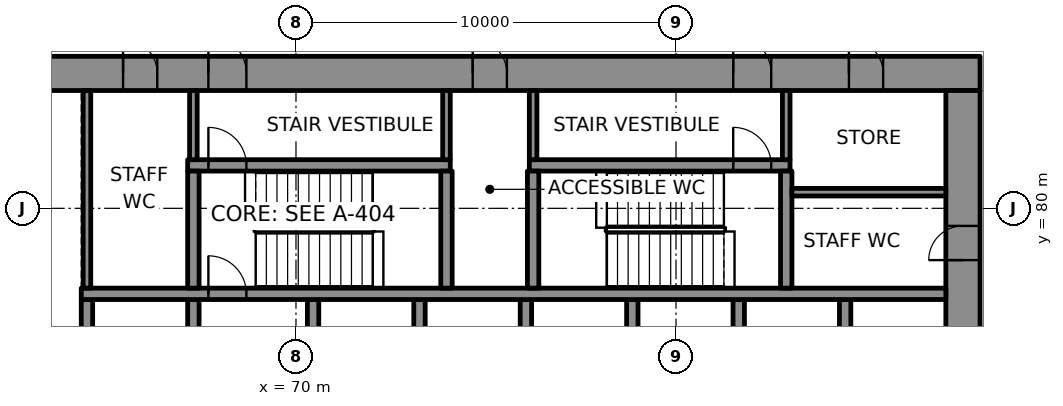
"""IFC4 building model, lengths in metres.
Left out: names, types, materials, properties, quantities, classifications, styles, units other than length and angle.
Written with IfcOpenShell. Run it as: python <this file> out.ifc"""

import sys

from ifc_helpers import new_model, si_unit, direction, frame, frame_2d, origin, place, context, subcontext, project, spatial, rectangle, extrude, element, fill, save


model = new_model("IFC4")
c1 = context("Model", 3, precision=1e-05, world=origin(), true_north=direction((0.0, 1.0)))
c2 = subcontext(c1, "Body", "Model", "MODEL_VIEW")
j1 = project(units=[si_unit("LENGTHUNIT", "METRE"), si_unit("PLANEANGLEUNIT", "RADIAN")], contexts=[c1])
p1 = place(None, origin())
s1 = spatial("IfcSite", under=j1, at=p1, CompositionType="ELEMENT")
p2 = place(p1, origin())
s2 = spatial("IfcBuilding", under=s1, at=p2, CompositionType="ELEMENT")
p3 = place(p2, frame((0.0, 0.0, 44.2)))
s3 = spatial("IfcBuildingStorey", under=s2, at=p3, CompositionType="ELEMENT", Elevation=44.2)
p4 = place(p3, frame((62.9, 83.55, 0.0), z_axis=(0.0, 0.0, 1.0), x_axis=(1.0, 0.0, 0.0)))
e1 = element("IfcWall", 1, at=p4, inside=s3, PredefinedType="SHEAR", context=c2, shape_type="SweptSolid", body=[
    extrude(rectangle(XDim=25.1, YDim=0.9, at=frame_2d((12.55, 0.0))), origin(), (0.0, 0.0, 1.0), 4.0),
])
p5 = place(p4, frame((4.795, 0.0, 0.0)))
e2 = element("IfcOpeningElement", 2, at=p5, cuts=e1, PredefinedType="OPENING", context=c2, shape_type="SweptSolid", body=[
    extrude(rectangle(XDim=1.0, YDim=2.1, at=frame_2d((0.5, 1.05))), frame((0.0, 0.46, 0.0), z_axis=(0.0, -1.0, 0.0), x_axis=(1.0, 0.0, 0.0)), (0.0, 0.0, 1.0), 0.92),
])
p6 = place(p4, frame((18.605, 0.0, 0.0)))
e3 = element("IfcOpeningElement", 3, at=p6, cuts=e1, PredefinedType="OPENING", context=c2, shape_type="SweptSolid", body=[
    extrude(rectangle(XDim=1.0, YDim=2.1, at=frame_2d((0.5, 1.05))), frame((0.0, 0.46, 0.0), z_axis=(0.0, -1.0, 0.0), x_axis=(1.0, 0.0, 0.0)), (0.0, 0.0, 1.0), 0.92),
])
p7 = place(p4, frame((2.55, 0.0, 0.0)))
e4 = element("IfcOpeningElement", 4, at=p7, cuts=e1, PredefinedType="OPENING", context=c2, shape_type="SweptSolid", body=[
    extrude(rectangle(XDim=0.9, YDim=2.1, at=frame_2d((0.45, 1.05))), frame((0.0, 0.46, 0.0), z_axis=(0.0, -1.0, 0.0), x_axis=(1.0, 0.0, 0.0)), (0.0, 0.0, 1.0), 0.92),
])
p8 = place(p4, frame((11.75, 0.0, 0.0)))
e5 = element("IfcOpeningElement", 5, at=p8, cuts=e1, PredefinedType="OPENING", context=c2, shape_type="SweptSolid", body=[
    extrude(rectangle(XDim=0.9, YDim=2.1, at=frame_2d((0.45, 1.05))), frame((0.0, 0.46, 0.0), z_axis=(0.0, -1.0, 0.0), x_axis=(1.0, 0.0, 0.0)), (0.0, 0.0, 1.0), 0.92),
])
p9 = place(p4, frame((21.65, 0.0, 0.0)))
e6 = element("IfcOpeningElement", 6, at=p9, cuts=e1, PredefinedType="OPENING", context=c2, shape_type="SweptSolid", body=[
    extrude(rectangle(XDim=0.9, YDim=2.1, at=frame_2d((0.45, 1.05))), frame((0.0, 0.46, 0.0), z_axis=(0.0, -1.0, 0.0), x_axis=(1.0, 0.0, 0.0)), (0.0, 0.0, 1.0), 0.92),
])
p10 = place(p3, frame((87.55, 66.9, 0.0), z_axis=(0.0, 0.0, 1.0), x_axis=(0.0, 1.0, 0.0)))
e7 = element("IfcWall", 7, at=p10, inside=s3, PredefinedType="SHEAR", context=c2, shape_type="SweptSolid", body=[
    extrude(rectangle(XDim=16.2, YDim=0.9, at=frame_2d((8.1, 0.0))), origin(), (0.0, 0.0, 1.0), 4.0),
])
p11 = place(p10, frame((5.5, 0.0, 0.0)))
e8 = element("IfcOpeningElement", 8, at=p11, cuts=e7, PredefinedType="OPENING", context=c2, shape_type="SweptSolid", body=[
    extrude(rectangle(XDim=1.8, YDim=2.1, at=frame_2d((0.9, 1.05))), frame((0.0, 0.46, 0.0), z_axis=(0.0, -1.0, 0.0), x_axis=(1.0, 0.0, 0.0)), (0.0, 0.0, 1.0), 0.92),
])
p12 = place(p10, frame((11.738, 0.0, 0.0)))
e9 = element("IfcOpeningElement", 9, at=p12, cuts=e7, PredefinedType="OPENING", context=c2, shape_type="SweptSolid", body=[
    extrude(rectangle(XDim=0.9, YDim=2.1, at=frame_2d((0.45, 1.05))), frame((0.0, 0.46, 0.0), z_axis=(0.0, -1.0, 0.0), x_axis=(1.0, 0.0, 0.0)), (0.0, 0.0, 1.0), 0.92),
])
for number, where, z_axis, x_axis in (
    (10, (64.5, 75.0, 0.0), (0.0, 0.0, 1.0), (0.0, 1.0, 0.0)),
    (11, (67.3, 75.0, 0.0), (0.0, 0.0, 1.0), (0.0, 1.0, 0.0)),
):
    element("IfcWall", number, at=place(p3, frame(where, z_axis=z_axis, x_axis=x_axis)), inside=s3, PredefinedType="SHEAR", context=c2, shape_type="SweptSolid", body=[
        extrude(rectangle(XDim=2.6, YDim=0.3, at=frame_2d((1.3, 0.0))), origin(), (0.0, 0.0, 1.0), 4.0),
    ])
p13 = place(p3, frame((70.45, 75.0, 0.0), z_axis=(0.0, 0.0, 1.0), x_axis=(0.0, 1.0, 0.0)))
e12 = element("IfcWall", 12, at=p13, inside=s3, PredefinedType="SHEAR", context=c2, shape_type="SweptSolid", body=[
    extrude(rectangle(XDim=2.6, YDim=0.3, at=frame_2d((1.3, 0.0))), origin(), (0.0, 0.0, 1.0), 4.0),
])
p14 = place(p13, frame((0.15, 0.0, 0.0)))
e13 = element("IfcOpeningElement", 13, at=p14, cuts=e12, PredefinedType="OPENING", context=c2, shape_type="SweptSolid", body=[
    extrude(rectangle(XDim=1.1, YDim=2.1, at=frame_2d((0.55, 1.05))), frame((0.0, 0.16, 0.0), z_axis=(0.0, -1.0, 0.0), x_axis=(1.0, 0.0, 0.0)), (0.0, 0.0, 1.0), 0.32),
])
for number, where, z_axis, x_axis in (
    (14, (73.25, 75.0, 0.0), (0.0, 0.0, 1.0), (0.0, 1.0, 0.0)),
    (15, (76.05, 75.0, 0.0), (0.0, 0.0, 1.0), (0.0, 1.0, 0.0)),
    (16, (78.85, 75.0, 0.0), (0.0, 0.0, 1.0), (0.0, 1.0, 0.0)),
    (17, (81.65, 75.0, 0.0), (0.0, 0.0, 1.0), (0.0, 1.0, 0.0)),
    (18, (84.45, 75.0, 0.0), (0.0, 0.0, 1.0), (0.0, 1.0, 0.0)),
):
    element("IfcWall", number, at=place(p3, frame(where, z_axis=z_axis, x_axis=x_axis)), inside=s3, PredefinedType="SHEAR", context=c2, shape_type="SweptSolid", body=[
        extrude(rectangle(XDim=2.6, YDim=0.3, at=frame_2d((1.3, 0.0))), origin(), (0.0, 0.0, 1.0), 4.0),
    ])
p15 = place(p3, frame((64.35, 77.75, 0.0), z_axis=(0.0, 0.0, 1.0), x_axis=(1.0, 0.0, 0.0)))
e19 = element("IfcWall", 19, at=p15, inside=s3, PredefinedType="SHEAR", context=c2, shape_type="SweptSolid", body=[
    extrude(rectangle(XDim=22.75, YDim=0.3, at=frame_2d((11.375, 0.0))), origin(), (0.0, 0.0, 1.0), 4.0),
])
p16 = place(p15, frame((3.345, 0.0, 0.0)))
e20 = element("IfcOpeningElement", 20, at=p16, cuts=e19, PredefinedType="OPENING", context=c2, shape_type="SweptSolid", body=[
    extrude(rectangle(XDim=1.0, YDim=2.1, at=frame_2d((0.5, 1.05))), frame((0.0, 0.16, 0.0), z_axis=(0.0, -1.0, 0.0), x_axis=(1.0, 0.0, 0.0)), (0.0, 0.0, 1.0), 0.32),
])
p17 = place(p3, frame((67.15, 81.13, 0.0), z_axis=(0.0, 0.0, 1.0), x_axis=(1.0, 0.0, 0.0)))
e21 = element("IfcWall", 21, at=p17, inside=s3, PredefinedType="SHEAR", context=c2, shape_type="SweptSolid", body=[
    extrude(rectangle(XDim=6.91, YDim=0.3, at=frame_2d((3.455, 0.0))), origin(), (0.0, 0.0, 1.0), 4.0),
])
p18 = place(p17, frame((0.545, 0.0, 0.0)))
e22 = element("IfcOpeningElement", 22, at=p18, cuts=e21, PredefinedType="OPENING", context=c2, shape_type="SweptSolid", body=[
    extrude(rectangle(XDim=1.0, YDim=2.1, at=frame_2d((0.5, 1.05))), frame((0.0, 0.16, 0.0), z_axis=(0.0, -1.0, 0.0), x_axis=(1.0, 0.0, 0.0)), (0.0, 0.0, 1.0), 0.32),
])
p19 = place(p3, frame((76.14, 81.13, 0.0), z_axis=(0.0, 0.0, 1.0), x_axis=(1.0, 0.0, 0.0)))
e23 = element("IfcWall", 23, at=p19, inside=s3, PredefinedType="SHEAR", context=c2, shape_type="SweptSolid", body=[
    extrude(rectangle(XDim=6.86, YDim=0.3, at=frame_2d((3.43, 0.0))), origin(), (0.0, 0.0, 1.0), 4.0),
])
p20 = place(p19, frame((5.365, 0.0, 0.0)))
e24 = element("IfcOpeningElement", 24, at=p20, cuts=e23, PredefinedType="OPENING", context=c2, shape_type="SweptSolid", body=[
    extrude(rectangle(XDim=1.0, YDim=2.1, at=frame_2d((0.5, 1.05))), frame((0.0, 0.16, 0.0), z_axis=(0.0, -1.0, 0.0), x_axis=(1.0, 0.0, 0.0)), (0.0, 0.0, 1.0), 0.32),
])
for number, where, z_axis, x_axis in (
    (25, (67.3, 77.9, 0.0), (0.0, 0.0, 1.0), (0.0, 1.0, 0.0)),
    (26, (73.96, 77.9, 0.0), (0.0, 0.0, 1.0), (0.0, 1.0, 0.0)),
    (27, (76.24, 77.9, 0.0), (0.0, 0.0, 1.0), (0.0, 1.0, 0.0)),
    (28, (82.9, 77.9, 0.0), (0.0, 0.0, 1.0), (0.0, 1.0, 0.0)),
):
    element("IfcWall", number, at=place(p3, frame(where, z_axis=z_axis, x_axis=x_axis)), inside=s3, PredefinedType="SHEAR", context=c2, shape_type="SweptSolid", body=[
        extrude(rectangle(XDim=3.08, YDim=0.3, at=frame_2d((1.54, 0.0))), origin(), (0.0, 0.0, 1.0), 4.0),
    ])
p21 = place(p3, frame((83.05, 80.425, 0.0), z_axis=(0.0, 0.0, 1.0), x_axis=(1.0, 0.0, 0.0)))
e29 = element("IfcWall", 29, at=p21, inside=s3, PredefinedType="PARTITIONING", context=c2, shape_type="SweptSolid", body=[
    extrude(rectangle(XDim=4.05, YDim=0.2, at=frame_2d((2.025, 0.0))), origin(), (0.0, 0.0, 1.0), 4.0),
])
p22 = place(p3, frame((64.5, 77.9, 0.0), z_axis=(0.0, 0.0, 1.0), x_axis=(0.0, 1.0, 0.0)))
e30 = element("IfcWall", 30, at=p22, inside=s3, PredefinedType="PARTITIONING", context=c2, shape_type="SweptSolid", body=[
    extrude(rectangle(XDim=5.2, YDim=0.2, at=frame_2d((2.6, 0.0))), origin(), (0.0, 0.0, 1.0), 4.0),
])
for number, where, z_axis, x_axis in (
    (31, (67.3, 81.28, 0.0), (0.0, 0.0, 1.0), (0.0, 1.0, 0.0)),
    (32, (73.96, 81.28, 0.0), (0.0, 0.0, 1.0), (0.0, 1.0, 0.0)),
    (33, (76.24, 81.28, 0.0), (0.0, 0.0, 1.0), (0.0, 1.0, 0.0)),
    (34, (82.9, 81.28, 0.0), (0.0, 0.0, 1.0), (0.0, 1.0, 0.0)),
):
    element("IfcWall", number, at=place(p3, frame(where, z_axis=z_axis, x_axis=x_axis)), inside=s3, PredefinedType="PARTITIONING", context=c2, shape_type="SweptSolid", body=[
        extrude(rectangle(XDim=1.82, YDim=0.2, at=frame_2d((0.91, 0.0))), origin(), (0.0, 0.0, 1.0), 4.0),
    ])
p23 = place(p16, origin())
e35 = element("IfcDoor", 35, at=p23, inside=s3, OperationType="SINGLE_SWING_LEFT", PredefinedType="DOOR", context=c2, shape_type="SweptSolid", body=[
    extrude(rectangle(XDim=1.0, YDim=2.1, at=frame_2d((0.5, 1.05))), frame((0.0, 0.025, 0.0), z_axis=(0.0, -1.0, 0.0), x_axis=(1.0, 0.0, 0.0)), (0.0, 0.0, 1.0), 0.05),
])
fill(e20, e35)
p24 = place(p18, origin())
e36 = element("IfcDoor", 36, at=p24, inside=s3, OperationType="SINGLE_SWING_RIGHT", PredefinedType="DOOR", context=c2, shape_type="SweptSolid", body=[
    extrude(rectangle(XDim=1.0, YDim=2.1, at=frame_2d((0.5, 1.05))), frame((0.0, 0.025, 0.0), z_axis=(0.0, -1.0, 0.0), x_axis=(1.0, 0.0, 0.0)), (0.0, 0.0, 1.0), 0.05),
])
fill(e22, e36)
p25 = place(p5, origin())
e37 = element("IfcDoor", 37, at=p25, inside=s3, OperationType="SINGLE_SWING_LEFT", PredefinedType="DOOR", context=c2, shape_type="SweptSolid", body=[
    extrude(rectangle(XDim=1.0, YDim=2.1, at=frame_2d((0.5, 1.05))), frame((0.0, 0.17, 0.0), z_axis=(0.0, -1.0, 0.0), x_axis=(1.0, 0.0, 0.0)), (0.0, 0.0, 1.0), 0.34),
])
fill(e2, e37)
p26 = place(p20, origin())
e38 = element("IfcDoor", 38, at=p26, inside=s3, OperationType="SINGLE_SWING_RIGHT", PredefinedType="DOOR", context=c2, shape_type="SweptSolid", body=[
    extrude(rectangle(XDim=1.0, YDim=2.1, at=frame_2d((0.5, 1.05))), frame((0.0, 0.025, 0.0), z_axis=(0.0, -1.0, 0.0), x_axis=(1.0, 0.0, 0.0)), (0.0, 0.0, 1.0), 0.05),
])
fill(e24, e38)
p27 = place(p6, origin())
e39 = element("IfcDoor", 39, at=p27, inside=s3, OperationType="SINGLE_SWING_LEFT", PredefinedType="DOOR", context=c2, shape_type="SweptSolid", body=[
    extrude(rectangle(XDim=1.0, YDim=2.1, at=frame_2d((0.5, 1.05))), frame((0.0, 0.17, 0.0), z_axis=(0.0, -1.0, 0.0), x_axis=(1.0, 0.0, 0.0)), (0.0, 0.0, 1.0), 0.34),
])
fill(e3, e39)
p28 = place(p7, origin())
e40 = element("IfcDoor", 40, at=p28, inside=s3, OperationType="SINGLE_SWING_RIGHT", PredefinedType="DOOR", context=c2, shape_type="SweptSolid", body=[
    extrude(rectangle(XDim=0.9, YDim=2.1, at=frame_2d((0.45, 1.05))), frame((0.0, 0.17, 0.0), z_axis=(0.0, -1.0, 0.0), x_axis=(1.0, 0.0, 0.0)), (0.0, 0.0, 1.0), 0.34),
])
fill(e4, e40)
p29 = place(p8, origin())
e41 = element("IfcDoor", 41, at=p29, inside=s3, OperationType="SINGLE_SWING_LEFT", PredefinedType="DOOR", context=c2, shape_type="SweptSolid", body=[
    extrude(rectangle(XDim=0.9, YDim=2.1, at=frame_2d((0.45, 1.05))), frame((0.0, 0.17, 0.0), z_axis=(0.0, -1.0, 0.0), x_axis=(1.0, 0.0, 0.0)), (0.0, 0.0, 1.0), 0.34),
])
fill(e5, e41)
p30 = place(p12, origin())
e42 = element("IfcDoor", 42, at=p30, inside=s3, OperationType="SINGLE_SWING_RIGHT", PredefinedType="DOOR", context=c2, shape_type="SweptSolid", body=[
    extrude(rectangle(XDim=0.9, YDim=2.1, at=frame_2d((0.45, 1.05))), frame((0.0, 0.17, 0.0), z_axis=(0.0, -1.0, 0.0), x_axis=(1.0, 0.0, 0.0)), (0.0, 0.0, 1.0), 0.34),
])
fill(e9, e42)
p31 = place(p9, origin())
e43 = element("IfcDoor", 43, at=p31, inside=s3, OperationType="SINGLE_SWING_LEFT", PredefinedType="DOOR", context=c2, shape_type="SweptSolid", body=[
    extrude(rectangle(XDim=0.9, YDim=2.1, at=frame_2d((0.45, 1.05))), frame((0.0, 0.17, 0.0), z_axis=(0.0, -1.0, 0.0), x_axis=(1.0, 0.0, 0.0)), (0.0, 0.0, 1.0), 0.34),
])
fill(e6, e43)
save(model, sys.argv[1])
